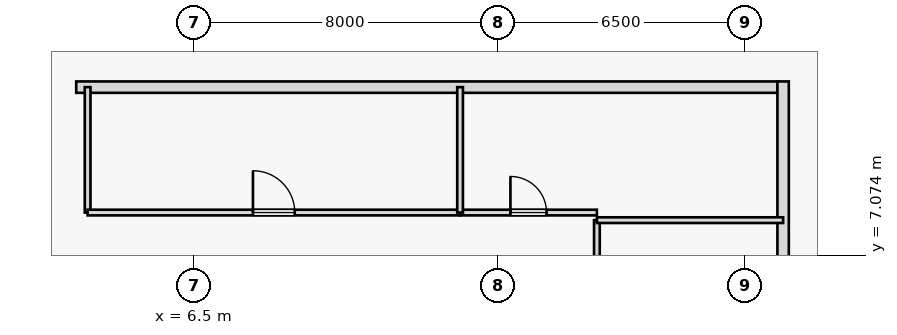
"""IFC4 building model, lengths in metres.
Left out: names, types, materials, properties, quantities, classifications, styles, units other than length and angle.
Written with IfcOpenShell. Run it as: python <this file> out.ifc"""

import sys

from ifc_helpers import new_model, si_unit, direction, frame, frame_2d, origin, place, context, subcontext, project, spatial, rectangle, extrude, element, fill, save


model = new_model("IFC4")
c1 = context("Model", 3, precision=1e-05, world=origin(), true_north=direction((0.0, 1.0)))
c2 = subcontext(c1, "Body", "Model", "MODEL_VIEW")
j1 = project(units=[si_unit("LENGTHUNIT", "METRE"), si_unit("PLANEANGLEUNIT", "RADIAN")], contexts=[c1])
p1 = place(None, origin())
s1 = spatial("IfcSite", under=j1, at=p1, CompositionType="ELEMENT")
p2 = place(p1, origin())
s2 = spatial("IfcBuilding", under=s1, at=p2, CompositionType="ELEMENT")
p3 = place(p2, origin())
s3 = spatial("IfcBuildingStorey", under=s2, at=p3, CompositionType="ELEMENT", Elevation=0.0)
p4 = place(p3, frame((3.4, 11.5, 0.0), z_axis=(0.0, 0.0, 1.0), x_axis=(1.0, 0.0, 0.0)))
e1 = element("IfcWall", 1, at=p4, inside=s3, PredefinedType="STANDARD", context=c2, shape_type="SweptSolid", body=[
    extrude(rectangle(XDim=18.45, YDim=0.3, at=frame_2d((9.225, 0.0))), origin(), (0.0, 0.0, 1.0), 9.195),
])
p5 = place(p4, frame((1.2, 0.0, 1.1)))
e2 = element("IfcOpeningElement", 2, at=p5, cuts=e1, PredefinedType="OPENING", context=c2, shape_type="SweptSolid", body=[
    extrude(rectangle(XDim=1.8, YDim=2.1, at=frame_2d((0.9, 1.05))), frame((0.0, 0.16, 0.0), z_axis=(0.0, -1.0, 0.0), x_axis=(1.0, 0.0, 0.0)), (0.0, 0.0, 1.0), 0.32),
])
p6 = place(p3, frame((22.0, -11.65, 0.0), z_axis=(0.0, 0.0, 1.0), x_axis=(0.0, 1.0, 0.0)))
e3 = element("IfcWall", 3, at=p6, inside=s3, PredefinedType="STANDARD", context=c2, shape_type="SweptSolid", body=[
    extrude(rectangle(XDim=23.3, YDim=0.3, at=frame_2d((11.65, 0.0))), origin(), (0.0, 0.0, 1.0), 9.195),
])
p7 = place(p6, frame((10.65, 0.0, 0.0)))
e4 = element("IfcOpeningElement", 4, at=p7, cuts=e3, PredefinedType="OPENING", context=c2, shape_type="SweptSolid", body=[
    extrude(rectangle(XDim=2.0, YDim=2.4, at=frame_2d((1.0, 1.2))), frame((0.0, 0.16, 0.0), z_axis=(0.0, -1.0, 0.0), x_axis=(1.0, 0.0, 0.0)), (0.0, 0.0, 1.0), 0.32),
])
p8 = place(p6, frame((1.4, 0.0, 1.1)))
e5 = element("IfcOpeningElement", 5, at=p8, cuts=e3, PredefinedType="OPENING", context=c2, shape_type="SweptSolid", body=[
    extrude(rectangle(XDim=2.4, YDim=2.1, at=frame_2d((1.2, 1.05))), frame((0.0, 0.16, 0.0), z_axis=(0.0, -1.0, 0.0), x_axis=(1.0, 0.0, 0.0)), (0.0, 0.0, 1.0), 0.32),
])
p9 = place(p6, frame((15.45, 0.0, 1.1)))
e6 = element("IfcOpeningElement", 6, at=p9, cuts=e3, PredefinedType="OPENING", context=c2, shape_type="SweptSolid", body=[
    extrude(rectangle(XDim=2.4, YDim=2.1, at=frame_2d((1.2, 1.05))), frame((0.0, 0.16, 0.0), z_axis=(0.0, -1.0, 0.0), x_axis=(1.0, 0.0, 0.0)), (0.0, 0.0, 1.0), 0.32),
])
p10 = place(p3, frame((3.7, 8.2, 0.0), z_axis=(0.0, 0.0, 1.0), x_axis=(0.0, 1.0, 0.0)))
e7 = element("IfcWall", 7, at=p10, inside=s3, PredefinedType="PARTITIONING", context=c2, shape_type="SweptSolid", body=[
    extrude(rectangle(XDim=3.3, YDim=0.15, at=frame_2d((1.65, 0.0))), origin(), (0.0, 0.0, 1.0), 8.14),
])
p11 = place(p3, frame((3.7, 8.2, 0.0), z_axis=(0.0, 0.0, 1.0), x_axis=(1.0, 0.0, 0.0)))
e8 = element("IfcWall", 8, at=p11, inside=s3, PredefinedType="PARTITIONING", context=c2, shape_type="SweptSolid", body=[
    extrude(rectangle(XDim=9.8, YDim=0.15, at=frame_2d((4.9, 0.0))), origin(), (0.0, 0.0, 1.0), 9.2),
])
p12 = place(p11, frame((4.35, 0.0, 0.0)))
e9 = element("IfcOpeningElement", 9, at=p12, cuts=e8, PredefinedType="OPENING", context=c2, shape_type="SweptSolid", body=[
    extrude(rectangle(XDim=1.1, YDim=2.15, at=frame_2d((0.55, 1.075))), frame((0.0, 0.085, 0.0), z_axis=(0.0, -1.0, 0.0), x_axis=(1.0, 0.0, 0.0)), (0.0, 0.0, 1.0), 0.17),
])
p13 = place(p3, frame((13.5, 8.2, 0.0), z_axis=(0.0, 0.0, 1.0), x_axis=(1.0, 0.0, 0.0)))
e10 = element("IfcWall", 10, at=p13, inside=s3, PredefinedType="PARTITIONING", context=c2, shape_type="SweptSolid", body=[
    extrude(rectangle(XDim=3.6, YDim=0.15, at=frame_2d((1.8, 0.0))), origin(), (0.0, 0.0, 1.0), 9.2),
])
p14 = place(p13, frame((1.325, 0.0, 0.0)))
e11 = element("IfcOpeningElement", 11, at=p14, cuts=e10, PredefinedType="OPENING", context=c2, shape_type="SweptSolid", body=[
    extrude(rectangle(XDim=0.95, YDim=2.15, at=frame_2d((0.475, 1.075))), frame((0.0, 0.085, 0.0), z_axis=(0.0, -1.0, 0.0), x_axis=(1.0, 0.0, 0.0)), (0.0, 0.0, 1.0), 0.17),
])
p15 = place(p3, frame((17.1, -8.2, 0.0), z_axis=(0.0, 0.0, 1.0), x_axis=(0.0, 1.0, 0.0)))
e12 = element("IfcWall", 12, at=p15, inside=s3, PredefinedType="PARTITIONING", context=c2, shape_type="SweptSolid", body=[
    extrude(rectangle(XDim=16.2, YDim=0.15, at=frame_2d((8.1, 0.0))), origin(), (0.0, 0.0, 1.0), 9.2),
])
p16 = place(p15, frame((4.92, 0.0, 0.0)))
e13 = element("IfcOpeningElement", 13, at=p16, cuts=e12, PredefinedType="OPENING", context=c2, shape_type="SweptSolid", body=[
    extrude(rectangle(XDim=1.5, YDim=2.15, at=frame_2d((0.75, 1.075))), frame((0.0, 0.085, 0.0), z_axis=(0.0, -1.0, 0.0), x_axis=(1.0, 0.0, 0.0)), (0.0, 0.0, 1.0), 0.17),
])
p17 = place(p3, frame((13.5, 8.2, 0.0), z_axis=(0.0, 0.0, 1.0), x_axis=(0.0, 1.0, 0.0)))
e14 = element("IfcWall", 14, at=p17, inside=s3, PredefinedType="PARTITIONING", context=c2, shape_type="SweptSolid", body=[
    extrude(rectangle(XDim=3.3, YDim=0.15, at=frame_2d((1.65, 0.0))), origin(), (0.0, 0.0, 1.0), 9.2),
])
p18 = place(p3, frame((17.1, 8.0, 0.0), z_axis=(0.0, 0.0, 1.0), x_axis=(1.0, 0.0, 0.0)))
e15 = element("IfcWall", 15, at=p18, inside=s3, PredefinedType="PARTITIONING", context=c2, shape_type="SweptSolid", body=[
    extrude(rectangle(XDim=4.9, YDim=0.15, at=frame_2d((2.45, 0.0))), origin(), (0.0, 0.0, 1.0), 9.2),
])
p19 = place(p5, origin())
e16 = element("IfcWindow", 16, at=p19, inside=s3, PartitioningType="SINGLE_PANEL", PredefinedType="WINDOW", context=c2, shape_type="SweptSolid", body=[
    extrude(rectangle(XDim=1.8, YDim=2.1, at=frame_2d((0.9, 1.05))), frame((0.0, 0.03, 0.0), z_axis=(0.0, -1.0, 0.0), x_axis=(1.0, 0.0, 0.0)), (0.0, 0.0, 1.0), 0.06),
])
fill(e2, e16)
p20 = place(p12, origin())
e17 = element("IfcDoor", 17, at=p20, inside=s3, OperationType="SINGLE_SWING_LEFT", PredefinedType="DOOR", context=c2, shape_type="SweptSolid", body=[
    extrude(rectangle(XDim=1.1, YDim=2.15, at=frame_2d((0.55, 1.075))), frame((0.0, 0.025, 0.0), z_axis=(0.0, -1.0, 0.0), x_axis=(1.0, 0.0, 0.0)), (0.0, 0.0, 1.0), 0.05),
])
fill(e9, e17)
p21 = place(p14, origin())
e18 = element("IfcDoor", 18, at=p21, inside=s3, OperationType="SINGLE_SWING_LEFT", PredefinedType="DOOR", context=c2, shape_type="SweptSolid", body=[
    extrude(rectangle(XDim=0.95, YDim=2.15, at=frame_2d((0.475, 1.075))), frame((0.0, 0.025, 0.0), z_axis=(0.0, -1.0, 0.0), x_axis=(1.0, 0.0, 0.0)), (0.0, 0.0, 1.0), 0.05),
])
fill(e11, e18)
save(model, sys.argv[1])
